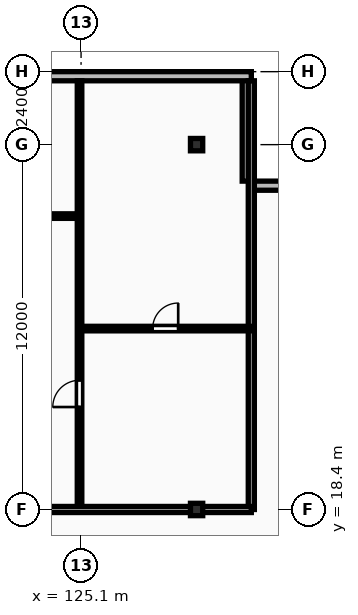
"""IFC4 building model, lengths in metres.
Left out: names, types, materials, properties, quantities, classifications, styles, units other than length and angle.
Written with IfcOpenShell. Run it as: python <this file> out.ifc"""

import sys

from ifc_helpers import new_model, si_unit, direction, frame, frame_2d, origin, origin_2d, place, context, subcontext, project, spatial, rectangle, i_section, extrude, element, fill, save


model = new_model("IFC4")
c1 = context("Model", 3, precision=1e-05, world=origin(), true_north=direction((0.0, 1.0)))
c2 = subcontext(c1, "Body", "Model", "MODEL_VIEW")
j1 = project(units=[si_unit("LENGTHUNIT", "METRE"), si_unit("PLANEANGLEUNIT", "RADIAN")], contexts=[c1])
p1 = place(None, origin())
s1 = spatial("IfcSite", under=j1, at=p1, CompositionType="ELEMENT")
p2 = place(p1, origin())
s2 = spatial("IfcBuilding", under=s1, at=p2, CompositionType="ELEMENT")
p3 = place(p2, frame((0.0, 0.0, 150.1)))
s3 = spatial("IfcBuildingStorey", under=s2, at=p3, CompositionType="ELEMENT", Elevation=150.1)
for number, where, z_axis, x_axis in (
    (1, (128.9, 18.4, 0.0), (0.0, 0.0, 1.0), (1.0, 0.0, 0.0)),
    (2, (128.9, 30.4, 0.0), (0.0, 0.0, 1.0), (1.0, 0.0, 0.0)),
):
    element("IfcColumn", number, at=place(p3, frame(where, z_axis=z_axis, x_axis=x_axis)), inside=s3, PredefinedType="COLUMN", context=c2, shape_type="SweptSolid", body=[
        extrude(i_section(OverallWidth=0.403, OverallDepth=0.406, WebThickness=0.027, FlangeThickness=0.043, FilletRadius=0.015, at=origin_2d()), origin(), (0.0, 0.0, 1.0), 3.6),
    ])
for number, where, z_axis, x_axis in (
    (3, (134.3, 29.05, 0.0), (0.0, 0.0, 1.0), (-1.0, 0.0, 0.0)),
    (4, (130.55, 29.2, 0.0), (0.0, 0.0, 1.0), (0.0, 1.0, 0.0)),
):
    element("IfcWall", number, at=place(p3, frame(where, z_axis=z_axis, x_axis=x_axis)), inside=s3, PredefinedType="STANDARD", context=c2, shape_type="SweptSolid", body=[
        extrude(rectangle(XDim=3.6, YDim=0.3, at=frame_2d((1.8, 0.0))), origin(), (0.0, 0.0, 1.0), 3.31),
    ])
p4 = place(p3, frame((130.7, 32.65, 0.0), z_axis=(0.0, 0.0, 1.0), x_axis=(-1.0, 0.0, 0.0)))
e5 = element("IfcWall", 5, at=p4, inside=s3, PredefinedType="STANDARD", context=c2, shape_type="SweptSolid", body=[
    extrude(rectangle(XDim=58.0, YDim=0.3, at=frame_2d((29.0, 0.0))), origin(), (0.0, 0.0, 1.0), 3.31),
])
p5 = place(p4, frame((50.125, 0.0, 0.85)))
e6 = element("IfcOpeningElement", 6, at=p5, cuts=e5, PredefinedType="OPENING", context=c2, shape_type="SweptSolid", body=[
    extrude(rectangle(XDim=1.8, YDim=1.8, at=frame_2d((0.9, 0.9))), frame((0.0, 0.16, 0.0), z_axis=(0.0, -1.0, 0.0), x_axis=(1.0, 0.0, 0.0)), (0.0, 0.0, 1.0), 0.32),
])
p6 = place(p4, frame((6.775, 0.0, 0.85)))
e7 = element("IfcOpeningElement", 7, at=p6, cuts=e5, PredefinedType="OPENING", context=c2, shape_type="SweptSolid", body=[
    extrude(rectangle(XDim=1.8, YDim=1.8, at=frame_2d((0.9, 0.9))), frame((0.0, 0.16, 0.0), z_axis=(0.0, -1.0, 0.0), x_axis=(1.0, 0.0, 0.0)), (0.0, 0.0, 1.0), 0.32),
])
p7 = place(p4, frame((38.0, 0.0, 0.0)))
e8 = element("IfcOpeningElement", 8, at=p7, cuts=e5, PredefinedType="OPENING", context=c2, shape_type="SweptSolid", body=[
    extrude(rectangle(XDim=1.1, YDim=2.1, at=frame_2d((0.55, 1.05))), frame((0.0, 0.16, 0.0), z_axis=(0.0, -1.0, 0.0), x_axis=(1.0, 0.0, 0.0)), (0.0, 0.0, 1.0), 0.32),
])
p8 = place(p3, frame((130.7, 18.4, 0.0), z_axis=(0.0, 0.0, 1.0), x_axis=(0.0, 1.0, 0.0)))
e9 = element("IfcWall", 9, at=p8, inside=s3, PredefinedType="PARTITIONING", context=c2, shape_type="SweptSolid", body=[
    extrude(rectangle(XDim=14.1, YDim=0.2, at=frame_2d((7.05, 0.0))), origin(), (0.0, 0.0, 1.0), 3.31),
])
p9 = place(p3, frame((125.05, 24.35, 0.0), z_axis=(0.0, 0.0, 1.0), x_axis=(1.0, 0.0, 0.0)))
e10 = element("IfcWall", 10, at=p9, inside=s3, PredefinedType="PARTITIONING", context=c2, shape_type="SweptSolid", body=[
    extrude(rectangle(XDim=5.65, YDim=0.15, at=frame_2d((2.825, 0.0))), origin(), (0.0, 0.0, 1.0), 3.31),
])
p10 = place(p9, frame((2.405, 0.0, 0.0)))
e11 = element("IfcOpeningElement", 11, at=p10, cuts=e10, PredefinedType="OPENING", context=c2, shape_type="SweptSolid", body=[
    extrude(rectangle(XDim=0.84, YDim=2.04, at=frame_2d((0.42, 1.02))), frame((0.0, 0.085, 0.0), z_axis=(0.0, -1.0, 0.0), x_axis=(1.0, 0.0, 0.0)), (0.0, 0.0, 1.0), 0.17),
])
p11 = place(p3, frame((125.05, 18.45, 0.0), z_axis=(0.0, 0.0, 1.0), x_axis=(0.0, 1.0, 0.0)))
e12 = element("IfcWall", 12, at=p11, inside=s3, PredefinedType="PARTITIONING", context=c2, shape_type="SweptSolid", body=[
    extrude(rectangle(XDim=14.05, YDim=0.15, at=frame_2d((7.025, 0.0))), origin(), (0.0, 0.0, 1.0), 3.31),
])
p12 = place(p11, frame((3.32, 0.0, 0.0)))
e13 = element("IfcOpeningElement", 13, at=p12, cuts=e12, PredefinedType="OPENING", context=c2, shape_type="SweptSolid", body=[
    extrude(rectangle(XDim=0.88, YDim=2.06, at=frame_2d((0.44, 1.03))), frame((0.0, 0.085, 0.0), z_axis=(0.0, -1.0, 0.0), x_axis=(1.0, 0.0, 0.0)), (0.0, 0.0, 1.0), 0.17),
])
p13 = place(p3, frame((118.27, 28.05, 0.0), z_axis=(0.0, 0.0, 1.0), x_axis=(1.0, 0.0, 0.0)))
e14 = element("IfcWall", 14, at=p13, inside=s3, PredefinedType="PARTITIONING", context=c2, shape_type="SweptSolid", body=[
    extrude(rectangle(XDim=6.76, YDim=0.15, at=frame_2d((3.38, 0.0))), origin(), (0.0, 0.0, 1.0), 3.31),
])
p14 = place(p13, frame((1.587, 0.0, 0.0)))
e15 = element("IfcOpeningElement", 15, at=p14, cuts=e14, PredefinedType="OPENING", context=c2, shape_type="SweptSolid", body=[
    extrude(rectangle(XDim=0.84, YDim=2.04, at=frame_2d((0.42, 1.02))), frame((0.0, 0.085, 0.0), z_axis=(0.0, -1.0, 0.0), x_axis=(1.0, 0.0, 0.0)), (0.0, 0.0, 1.0), 0.17),
])
p15 = place(p13, frame((3.042, 0.0, 0.0)))
e16 = element("IfcOpeningElement", 16, at=p15, cuts=e14, PredefinedType="OPENING", context=c2, shape_type="SweptSolid", body=[
    extrude(rectangle(XDim=0.88, YDim=2.06, at=frame_2d((0.44, 1.03))), frame((0.0, 0.085, 0.0), z_axis=(0.0, -1.0, 0.0), x_axis=(1.0, 0.0, 0.0)), (0.0, 0.0, 1.0), 0.17),
])
p16 = place(p3, frame((118.25, 18.4, 0.0), z_axis=(0.0, 0.0, 1.0), x_axis=(1.0, 0.0, 0.0)))
e17 = element("IfcWall", 17, at=p16, inside=s3, PredefinedType="PARTITIONING", context=c2, shape_type="SweptSolid", body=[
    extrude(rectangle(XDim=12.45, YDim=0.2, at=frame_2d((6.225, 0.0))), origin(), (0.0, 0.0, 1.0), 2.698),
])
p17 = place(p16, frame((1.51, 0.0, 0.0)))
e18 = element("IfcOpeningElement", 18, at=p17, cuts=e17, PredefinedType="OPENING", context=c2, shape_type="SweptSolid", body=[
    extrude(rectangle(XDim=0.95, YDim=2.15, at=frame_2d((0.475, 1.075))), frame((0.0, 0.11, 0.0), z_axis=(0.0, -1.0, 0.0), x_axis=(1.0, 0.0, 0.0)), (0.0, 0.0, 1.0), 0.22),
])
p18 = place(p10, origin())
e19 = element("IfcDoor", 19, at=p18, inside=s3, OperationType="SINGLE_SWING_RIGHT", PredefinedType="DOOR", context=c2, shape_type="SweptSolid", body=[
    extrude(rectangle(XDim=0.84, YDim=2.04, at=frame_2d((0.42, 1.02))), frame((0.0, 0.025, 0.0), z_axis=(0.0, -1.0, 0.0), x_axis=(1.0, 0.0, 0.0)), (0.0, 0.0, 1.0), 0.05),
])
fill(e11, e19)
p19 = place(p12, origin())
e20 = element("IfcDoor", 20, at=p19, inside=s3, OperationType="SINGLE_SWING_LEFT", PredefinedType="DOOR", context=c2, shape_type="SweptSolid", body=[
    extrude(rectangle(XDim=0.88, YDim=2.06, at=frame_2d((0.44, 1.03))), frame((0.0, 0.025, 0.0), z_axis=(0.0, -1.0, 0.0), x_axis=(1.0, 0.0, 0.0)), (0.0, 0.0, 1.0), 0.05),
])
fill(e13, e20)
save(model, sys.argv[1])
